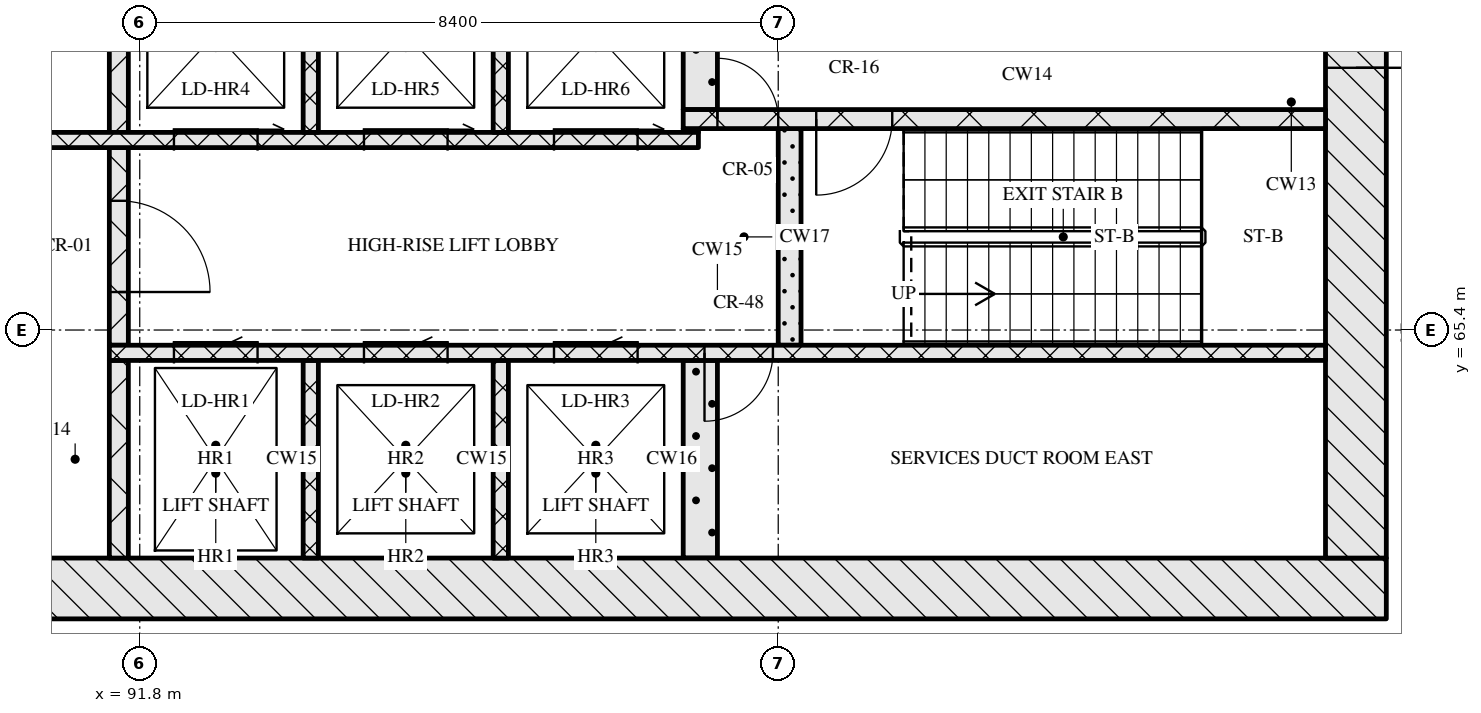
"""IFC4 building model, lengths in metres.
Left out: names, types, materials, properties, quantities, classifications, styles, units other than length and angle.
Written with IfcOpenShell. Run it as: python <this file> out.ifc"""

import sys

from ifc_helpers import new_model, si_unit, direction, frame, frame_2d, origin, place, context, subcontext, project, spatial, rectangle, extrude, element, fill, save


model = new_model("IFC4")
c1 = context("Model", 3, precision=1e-05, world=origin(), true_north=direction((0.0, 1.0)))
c2 = subcontext(c1, "Body", "Model", "MODEL_VIEW")
j1 = project(units=[si_unit("LENGTHUNIT", "METRE"), si_unit("PLANEANGLEUNIT", "RADIAN")], contexts=[c1])
p1 = place(None, origin())
s1 = spatial("IfcSite", under=j1, at=p1, CompositionType="ELEMENT")
p2 = place(p1, origin())
s2 = spatial("IfcBuilding", under=s1, at=p2, CompositionType="ELEMENT")
p3 = place(p2, frame((0.0, 0.0, 142.05)))
s3 = spatial("IfcBuildingStorey", under=s2, at=p3, CompositionType="ELEMENT", Elevation=142.05)
p4 = place(p3, frame((67.0, 62.0, 0.0), z_axis=(0.0, 0.0, 1.0), x_axis=(1.0, 0.0, 0.0)))
e1 = element("IfcWall", 1, at=p4, inside=s3, PredefinedType="SOLIDWALL", context=c2, shape_type="SweptSolid", body=[
    extrude(rectangle(XDim=41.2, YDim=0.8, at=frame_2d((20.6, 0.0))), origin(), (0.0, 0.0, 1.0), 5.12),
])
p5 = place(p4, frame((20.95, 0.0, 0.0)))
e2 = element("IfcOpeningElement", 2, at=p5, cuts=e1, PredefinedType="OPENING", context=c2, shape_type="SweptSolid", body=[
    extrude(rectangle(XDim=1.8, YDim=2.1, at=frame_2d((0.9, 1.05))), frame((0.0, 0.41, 0.0), z_axis=(0.0, -1.0, 0.0), x_axis=(1.0, 0.0, 0.0)), (0.0, 0.0, 1.0), 0.82),
])
p6 = place(p3, frame((107.8, 62.4, 0.0), z_axis=(0.0, 0.0, 1.0), x_axis=(0.0, 1.0, 0.0)))
e3 = element("IfcWall", 3, at=p6, inside=s3, PredefinedType="SOLIDWALL", context=c2, shape_type="SweptSolid", body=[
    extrude(rectangle(XDim=12.0, YDim=0.8, at=frame_2d((6.0, 0.0))), origin(), (0.0, 0.0, 1.0), 5.12),
])
p7 = place(p6, frame((6.45, 0.0, 0.0)))
e4 = element("IfcOpeningElement", 4, at=p7, cuts=e3, PredefinedType="OPENING", context=c2, shape_type="SweptSolid", body=[
    extrude(rectangle(XDim=1.2, YDim=2.1, at=frame_2d((0.6, 1.05))), frame((0.0, 0.41, 0.0), z_axis=(0.0, -1.0, 0.0), x_axis=(1.0, 0.0, 0.0)), (0.0, 0.0, 1.0), 0.82),
])
p8 = place(p3, frame((91.525, 62.4, 0.0), z_axis=(0.0, 0.0, 1.0), x_axis=(0.0, 1.0, 0.0)))
e5 = element("IfcWall", 5, at=p8, inside=s3, PredefinedType="SOLIDWALL", context=c2, shape_type="SweptSolid", body=[
    extrude(rectangle(XDim=2.6, YDim=0.25, at=frame_2d((1.3, 0.0))), origin(), (0.0, 0.0, 1.0), 5.12),
])
for number, where, z_axis, x_axis in (
    (6, (94.05, 62.4, 0.0), (0.0, 0.0, 1.0), (0.0, 1.0, 0.0)),
    (7, (96.55, 62.4, 0.0), (0.0, 0.0, 1.0), (0.0, 1.0, 0.0)),
):
    element("IfcWall", number, at=place(p3, frame(where, z_axis=z_axis, x_axis=x_axis)), inside=s3, PredefinedType="SOLIDWALL", context=c2, shape_type="SweptSolid", body=[
        extrude(rectangle(XDim=2.6, YDim=0.2, at=frame_2d((1.3, 0.0))), origin(), (0.0, 0.0, 1.0), 5.12),
    ])
p9 = place(p3, frame((99.175, 62.4, 0.0), z_axis=(0.0, 0.0, 1.0), x_axis=(0.0, 1.0, 0.0)))
e8 = element("IfcWall", 8, at=p9, inside=s3, PredefinedType="SOLIDWALL", context=c2, shape_type="SweptSolid", body=[
    extrude(rectangle(XDim=2.6, YDim=0.45, at=frame_2d((1.3, 0.0))), origin(), (0.0, 0.0, 1.0), 5.12),
])
p10 = place(p3, frame((91.4, 65.1, 0.0), z_axis=(0.0, 0.0, 1.0), x_axis=(1.0, 0.0, 0.0)))
e9 = element("IfcWall", 9, at=p10, inside=s3, PredefinedType="SOLIDWALL", context=c2, shape_type="SweptSolid", body=[
    extrude(rectangle(XDim=16.0, YDim=0.2, at=frame_2d((8.0, 0.0))), origin(), (0.0, 0.0, 1.0), 5.12),
])
p11 = place(p10, frame((0.85, 0.0, 0.0)))
e10 = element("IfcOpeningElement", 10, at=p11, cuts=e9, PredefinedType="OPENING", context=c2, shape_type="SweptSolid", body=[
    extrude(rectangle(XDim=1.1, YDim=2.1, at=frame_2d((0.55, 1.05))), frame((0.0, 0.11, 0.0), z_axis=(0.0, -1.0, 0.0), x_axis=(1.0, 0.0, 0.0)), (0.0, 0.0, 1.0), 0.22),
])
p12 = place(p10, frame((3.35, 0.0, 0.0)))
e11 = element("IfcOpeningElement", 11, at=p12, cuts=e9, PredefinedType="OPENING", context=c2, shape_type="SweptSolid", body=[
    extrude(rectangle(XDim=1.1, YDim=2.1, at=frame_2d((0.55, 1.05))), frame((0.0, 0.11, 0.0), z_axis=(0.0, -1.0, 0.0), x_axis=(1.0, 0.0, 0.0)), (0.0, 0.0, 1.0), 0.22),
])
p13 = place(p10, frame((5.85, 0.0, 0.0)))
e12 = element("IfcOpeningElement", 12, at=p13, cuts=e9, PredefinedType="OPENING", context=c2, shape_type="SweptSolid", body=[
    extrude(rectangle(XDim=1.1, YDim=2.1, at=frame_2d((0.55, 1.05))), frame((0.0, 0.11, 0.0), z_axis=(0.0, -1.0, 0.0), x_axis=(1.0, 0.0, 0.0)), (0.0, 0.0, 1.0), 0.22),
])
p14 = place(p10, frame((7.83, 0.0, 0.0)))
e13 = element("IfcOpeningElement", 13, at=p14, cuts=e9, PredefinedType="OPENING", context=c2, shape_type="SweptSolid", body=[
    extrude(rectangle(XDim=0.9, YDim=2.1, at=frame_2d((0.45, 1.05))), frame((0.0, 0.11, 0.0), z_axis=(0.0, -1.0, 0.0), x_axis=(1.0, 0.0, 0.0)), (0.0, 0.0, 1.0), 0.22),
])
p15 = place(p3, frame((91.525, 65.2, 0.0), z_axis=(0.0, 0.0, 1.0), x_axis=(0.0, 1.0, 0.0)))
e14 = element("IfcWall", 14, at=p15, inside=s3, PredefinedType="SOLIDWALL", context=c2, shape_type="SweptSolid", body=[
    extrude(rectangle(XDim=2.6, YDim=0.25, at=frame_2d((1.3, 0.0))), origin(), (0.0, 0.0, 1.0), 5.12),
])
p16 = place(p15, frame((0.7, 0.0, 0.0)))
e15 = element("IfcOpeningElement", 15, at=p16, cuts=e14, PredefinedType="OPENING", context=c2, shape_type="SweptSolid", body=[
    extrude(rectangle(XDim=1.2, YDim=2.1, at=frame_2d((0.6, 1.05))), frame((0.0, 0.135, 0.0), z_axis=(0.0, -1.0, 0.0), x_axis=(1.0, 0.0, 0.0)), (0.0, 0.0, 1.0), 0.27),
])
p17 = place(p3, frame((100.35, 65.2, 0.0), z_axis=(0.0, 0.0, 1.0), x_axis=(0.0, 1.0, 0.0)))
e16 = element("IfcWall", 16, at=p17, inside=s3, PredefinedType="SOLIDWALL", context=c2, shape_type="SweptSolid", body=[
    extrude(rectangle(XDim=2.85, YDim=0.3, at=frame_2d((1.425, 0.0))), origin(), (0.0, 0.0, 1.0), 5.12),
])
p18 = place(p3, frame((76.05, 67.9, 0.0), z_axis=(0.0, 0.0, 1.0), x_axis=(1.0, 0.0, 0.0)))
e17 = element("IfcWall", 17, at=p18, inside=s3, PredefinedType="SOLIDWALL", context=c2, shape_type="SweptSolid", body=[
    extrude(rectangle(XDim=23.1, YDim=0.2, at=frame_2d((11.55, 0.0))), origin(), (0.0, 0.0, 1.0), 5.12),
])
p19 = place(p18, frame((0.6, 0.0, 0.0)))
e18 = element("IfcOpeningElement", 18, at=p19, cuts=e17, PredefinedType="OPENING", context=c2, shape_type="SweptSolid", body=[
    extrude(rectangle(XDim=1.1, YDim=2.1, at=frame_2d((0.55, 1.05))), frame((0.0, 0.11, 0.0), z_axis=(0.0, -1.0, 0.0), x_axis=(1.0, 0.0, 0.0)), (0.0, 0.0, 1.0), 0.22),
])
p20 = place(p18, frame((3.1, 0.0, 0.0)))
e19 = element("IfcOpeningElement", 19, at=p20, cuts=e17, PredefinedType="OPENING", context=c2, shape_type="SweptSolid", body=[
    extrude(rectangle(XDim=1.1, YDim=2.1, at=frame_2d((0.55, 1.05))), frame((0.0, 0.11, 0.0), z_axis=(0.0, -1.0, 0.0), x_axis=(1.0, 0.0, 0.0)), (0.0, 0.0, 1.0), 0.22),
])
p21 = place(p18, frame((5.6, 0.0, 0.0)))
e20 = element("IfcOpeningElement", 20, at=p21, cuts=e17, PredefinedType="OPENING", context=c2, shape_type="SweptSolid", body=[
    extrude(rectangle(XDim=1.1, YDim=2.1, at=frame_2d((0.55, 1.05))), frame((0.0, 0.11, 0.0), z_axis=(0.0, -1.0, 0.0), x_axis=(1.0, 0.0, 0.0)), (0.0, 0.0, 1.0), 0.22),
])
p22 = place(p18, frame((8.45, 0.0, 0.0)))
e21 = element("IfcOpeningElement", 21, at=p22, cuts=e17, PredefinedType="OPENING", context=c2, shape_type="SweptSolid", body=[
    extrude(rectangle(XDim=0.9, YDim=2.1, at=frame_2d((0.45, 1.05))), frame((0.0, 0.11, 0.0), z_axis=(0.0, -1.0, 0.0), x_axis=(1.0, 0.0, 0.0)), (0.0, 0.0, 1.0), 0.22),
])
p23 = place(p18, frame((10.91, 0.0, 0.0)))
e22 = element("IfcOpeningElement", 22, at=p23, cuts=e17, PredefinedType="OPENING", context=c2, shape_type="SweptSolid", body=[
    extrude(rectangle(XDim=0.9, YDim=2.1, at=frame_2d((0.45, 1.05))), frame((0.0, 0.11, 0.0), z_axis=(0.0, -1.0, 0.0), x_axis=(1.0, 0.0, 0.0)), (0.0, 0.0, 1.0), 0.22),
])
p24 = place(p18, frame((13.55, 0.0, 0.0)))
e23 = element("IfcOpeningElement", 23, at=p24, cuts=e17, PredefinedType="OPENING", context=c2, shape_type="SweptSolid", body=[
    extrude(rectangle(XDim=1.0, YDim=2.1, at=frame_2d((0.5, 1.05))), frame((0.0, 0.11, 0.0), z_axis=(0.0, -1.0, 0.0), x_axis=(1.0, 0.0, 0.0)), (0.0, 0.0, 1.0), 0.22),
])
p25 = place(p18, frame((16.2, 0.0, 0.0)))
e24 = element("IfcOpeningElement", 24, at=p25, cuts=e17, PredefinedType="OPENING", context=c2, shape_type="SweptSolid", body=[
    extrude(rectangle(XDim=1.1, YDim=2.1, at=frame_2d((0.55, 1.05))), frame((0.0, 0.11, 0.0), z_axis=(0.0, -1.0, 0.0), x_axis=(1.0, 0.0, 0.0)), (0.0, 0.0, 1.0), 0.22),
])
p26 = place(p18, frame((18.7, 0.0, 0.0)))
e25 = element("IfcOpeningElement", 25, at=p26, cuts=e17, PredefinedType="OPENING", context=c2, shape_type="SweptSolid", body=[
    extrude(rectangle(XDim=1.1, YDim=2.1, at=frame_2d((0.55, 1.05))), frame((0.0, 0.11, 0.0), z_axis=(0.0, -1.0, 0.0), x_axis=(1.0, 0.0, 0.0)), (0.0, 0.0, 1.0), 0.22),
])
p27 = place(p18, frame((21.2, 0.0, 0.0)))
e26 = element("IfcOpeningElement", 26, at=p27, cuts=e17, PredefinedType="OPENING", context=c2, shape_type="SweptSolid", body=[
    extrude(rectangle(XDim=1.1, YDim=2.1, at=frame_2d((0.55, 1.05))), frame((0.0, 0.11, 0.0), z_axis=(0.0, -1.0, 0.0), x_axis=(1.0, 0.0, 0.0)), (0.0, 0.0, 1.0), 0.22),
])
p28 = place(p3, frame((91.525, 68.0, 0.0), z_axis=(0.0, 0.0, 1.0), x_axis=(0.0, 1.0, 0.0)))
e27 = element("IfcWall", 27, at=p28, inside=s3, PredefinedType="SOLIDWALL", context=c2, shape_type="SweptSolid", body=[
    extrude(rectangle(XDim=2.6, YDim=0.25, at=frame_2d((1.3, 0.0))), origin(), (0.0, 0.0, 1.0), 5.12),
])
for number, where, z_axis, x_axis in (
    (28, (94.05, 68.0, 0.0), (0.0, 0.0, 1.0), (0.0, 1.0, 0.0)),
    (29, (96.55, 68.0, 0.0), (0.0, 0.0, 1.0), (0.0, 1.0, 0.0)),
):
    element("IfcWall", number, at=place(p3, frame(where, z_axis=z_axis, x_axis=x_axis)), inside=s3, PredefinedType="SOLIDWALL", context=c2, shape_type="SweptSolid", body=[
        extrude(rectangle(XDim=2.6, YDim=0.2, at=frame_2d((1.3, 0.0))), origin(), (0.0, 0.0, 1.0), 5.12),
    ])
p29 = place(p3, frame((98.95, 68.025, 0.0), z_axis=(0.0, 0.0, 1.0), x_axis=(1.0, 0.0, 0.0)))
e30 = element("IfcWall", 30, at=p29, inside=s3, PredefinedType="SOLIDWALL", context=c2, shape_type="SweptSolid", body=[
    extrude(rectangle(XDim=0.2, YDim=0.05, at=frame_2d((0.1, 0.0))), origin(), (0.0, 0.0, 1.0), 5.12),
])
p30 = place(p3, frame((98.95, 68.175, 0.0), z_axis=(0.0, 0.0, 1.0), x_axis=(1.0, 0.0, 0.0)))
e31 = element("IfcWall", 31, at=p30, inside=s3, PredefinedType="SOLIDWALL", context=c2, shape_type="SweptSolid", body=[
    extrude(rectangle(XDim=8.45, YDim=0.25, at=frame_2d((4.225, 0.0))), origin(), (0.0, 0.0, 1.0), 5.12),
])
p31 = place(p30, frame((0.45, 0.0, 0.0)))
e32 = element("IfcOpeningElement", 32, at=p31, cuts=e31, PredefinedType="OPENING", context=c2, shape_type="SweptSolid", body=[
    extrude(rectangle(XDim=0.8, YDim=2.1, at=frame_2d((0.4, 1.05))), frame((0.0, 0.135, 0.0), z_axis=(0.0, -1.0, 0.0), x_axis=(1.0, 0.0, 0.0)), (0.0, 0.0, 1.0), 0.27),
])
p32 = place(p30, frame((1.75, 0.0, 0.0)))
e33 = element("IfcOpeningElement", 33, at=p32, cuts=e31, PredefinedType="OPENING", context=c2, shape_type="SweptSolid", body=[
    extrude(rectangle(XDim=1.0, YDim=2.1, at=frame_2d((0.5, 1.05))), frame((0.0, 0.135, 0.0), z_axis=(0.0, -1.0, 0.0), x_axis=(1.0, 0.0, 0.0)), (0.0, 0.0, 1.0), 0.27),
])
p33 = place(p3, frame((99.175, 68.3, 0.0), z_axis=(0.0, 0.0, 1.0), x_axis=(0.0, 1.0, 0.0)))
e34 = element("IfcWall", 34, at=p33, inside=s3, PredefinedType="SOLIDWALL", context=c2, shape_type="SweptSolid", body=[
    extrude(rectangle(XDim=2.3, YDim=0.45, at=frame_2d((1.15, 0.0))), origin(), (0.0, 0.0, 1.0), 5.12),
])
p34 = place(p11, origin())
e35 = element("IfcDoor", 35, at=p34, inside=s3, OperationType="SLIDING_TO_LEFT", PredefinedType="DOOR", context=c2, shape_type="SweptSolid", body=[
    extrude(rectangle(XDim=1.1, YDim=2.1, at=frame_2d((0.55, 1.05))), frame((0.0, 0.025, 0.0), z_axis=(0.0, -1.0, 0.0), x_axis=(1.0, 0.0, 0.0)), (0.0, 0.0, 1.0), 0.05),
])
fill(e10, e35)
p35 = place(p12, origin())
e36 = element("IfcDoor", 36, at=p35, inside=s3, OperationType="SLIDING_TO_LEFT", PredefinedType="DOOR", context=c2, shape_type="SweptSolid", body=[
    extrude(rectangle(XDim=1.1, YDim=2.1, at=frame_2d((0.55, 1.05))), frame((0.0, 0.025, 0.0), z_axis=(0.0, -1.0, 0.0), x_axis=(1.0, 0.0, 0.0)), (0.0, 0.0, 1.0), 0.05),
])
fill(e11, e36)
p36 = place(p13, origin())
e37 = element("IfcDoor", 37, at=p36, inside=s3, OperationType="SLIDING_TO_LEFT", PredefinedType="DOOR", context=c2, shape_type="SweptSolid", body=[
    extrude(rectangle(XDim=1.1, YDim=2.1, at=frame_2d((0.55, 1.05))), frame((0.0, 0.025, 0.0), z_axis=(0.0, -1.0, 0.0), x_axis=(1.0, 0.0, 0.0)), (0.0, 0.0, 1.0), 0.05),
])
fill(e12, e37)
p37 = place(p14, origin())
e38 = element("IfcDoor", 38, at=p37, inside=s3, OperationType="SINGLE_SWING_RIGHT", PredefinedType="DOOR", context=c2, shape_type="SweptSolid", body=[
    extrude(rectangle(XDim=0.9, YDim=2.1, at=frame_2d((0.45, 1.05))), frame((0.0, 0.025, 0.0), z_axis=(0.0, -1.0, 0.0), x_axis=(1.0, 0.0, 0.0)), (0.0, 0.0, 1.0), 0.05),
])
fill(e13, e38)
p38 = place(p16, origin())
e39 = element("IfcDoor", 39, at=p38, inside=s3, OperationType="SINGLE_SWING_RIGHT", PredefinedType="DOOR", context=c2, shape_type="SweptSolid", body=[
    extrude(rectangle(XDim=1.2, YDim=2.1, at=frame_2d((0.6, 1.05))), frame((0.0, 0.025, 0.0), z_axis=(0.0, -1.0, 0.0), x_axis=(1.0, 0.0, 0.0)), (0.0, 0.0, 1.0), 0.05),
])
fill(e15, e39)
p39 = place(p25, origin())
e40 = element("IfcDoor", 40, at=p39, inside=s3, OperationType="SLIDING_TO_RIGHT", PredefinedType="DOOR", context=c2, shape_type="SweptSolid", body=[
    extrude(rectangle(XDim=1.1, YDim=2.1, at=frame_2d((0.55, 1.05))), frame((0.0, 0.025, 0.0), z_axis=(0.0, -1.0, 0.0), x_axis=(1.0, 0.0, 0.0)), (0.0, 0.0, 1.0), 0.05),
])
fill(e24, e40)
p40 = place(p26, origin())
e41 = element("IfcDoor", 41, at=p40, inside=s3, OperationType="SLIDING_TO_RIGHT", PredefinedType="DOOR", context=c2, shape_type="SweptSolid", body=[
    extrude(rectangle(XDim=1.1, YDim=2.1, at=frame_2d((0.55, 1.05))), frame((0.0, 0.025, 0.0), z_axis=(0.0, -1.0, 0.0), x_axis=(1.0, 0.0, 0.0)), (0.0, 0.0, 1.0), 0.05),
])
fill(e25, e41)
p41 = place(p27, origin())
e42 = element("IfcDoor", 42, at=p41, inside=s3, OperationType="SLIDING_TO_RIGHT", PredefinedType="DOOR", context=c2, shape_type="SweptSolid", body=[
    extrude(rectangle(XDim=1.1, YDim=2.1, at=frame_2d((0.55, 1.05))), frame((0.0, 0.025, 0.0), z_axis=(0.0, -1.0, 0.0), x_axis=(1.0, 0.0, 0.0)), (0.0, 0.0, 1.0), 0.05),
])
fill(e26, e42)
p42 = place(p31, origin())
e43 = element("IfcDoor", 43, at=p42, inside=s3, OperationType="SINGLE_SWING_LEFT", PredefinedType="DOOR", context=c2, shape_type="SweptSolid", body=[
    extrude(rectangle(XDim=0.8, YDim=2.1, at=frame_2d((0.4, 1.05))), frame((0.0, 0.025, 0.0), z_axis=(0.0, -1.0, 0.0), x_axis=(1.0, 0.0, 0.0)), (0.0, 0.0, 1.0), 0.05),
])
fill(e32, e43)
p43 = place(p32, origin())
e44 = element("IfcDoor", 44, at=p43, inside=s3, OperationType="SINGLE_SWING_RIGHT", PredefinedType="DOOR", context=c2, shape_type="SweptSolid", body=[
    extrude(rectangle(XDim=1.0, YDim=2.1, at=frame_2d((0.5, 1.05))), frame((0.0, 0.025, 0.0), z_axis=(0.0, -1.0, 0.0), x_axis=(1.0, 0.0, 0.0)), (0.0, 0.0, 1.0), 0.05),
])
fill(e33, e44)
p44 = place(p7, origin())
e45 = element("IfcDoor", 45, at=p44, inside=s3, OperationType="SINGLE_SWING_RIGHT", PredefinedType="DOOR", context=c2, shape_type="SweptSolid", body=[
    extrude(rectangle(XDim=1.2, YDim=2.1, at=frame_2d((0.6, 1.05))), frame((0.0, 0.025, 0.0), z_axis=(0.0, -1.0, 0.0), x_axis=(1.0, 0.0, 0.0)), (0.0, 0.0, 1.0), 0.05),
])
fill(e4, e45)
save(model, sys.argv[1])
